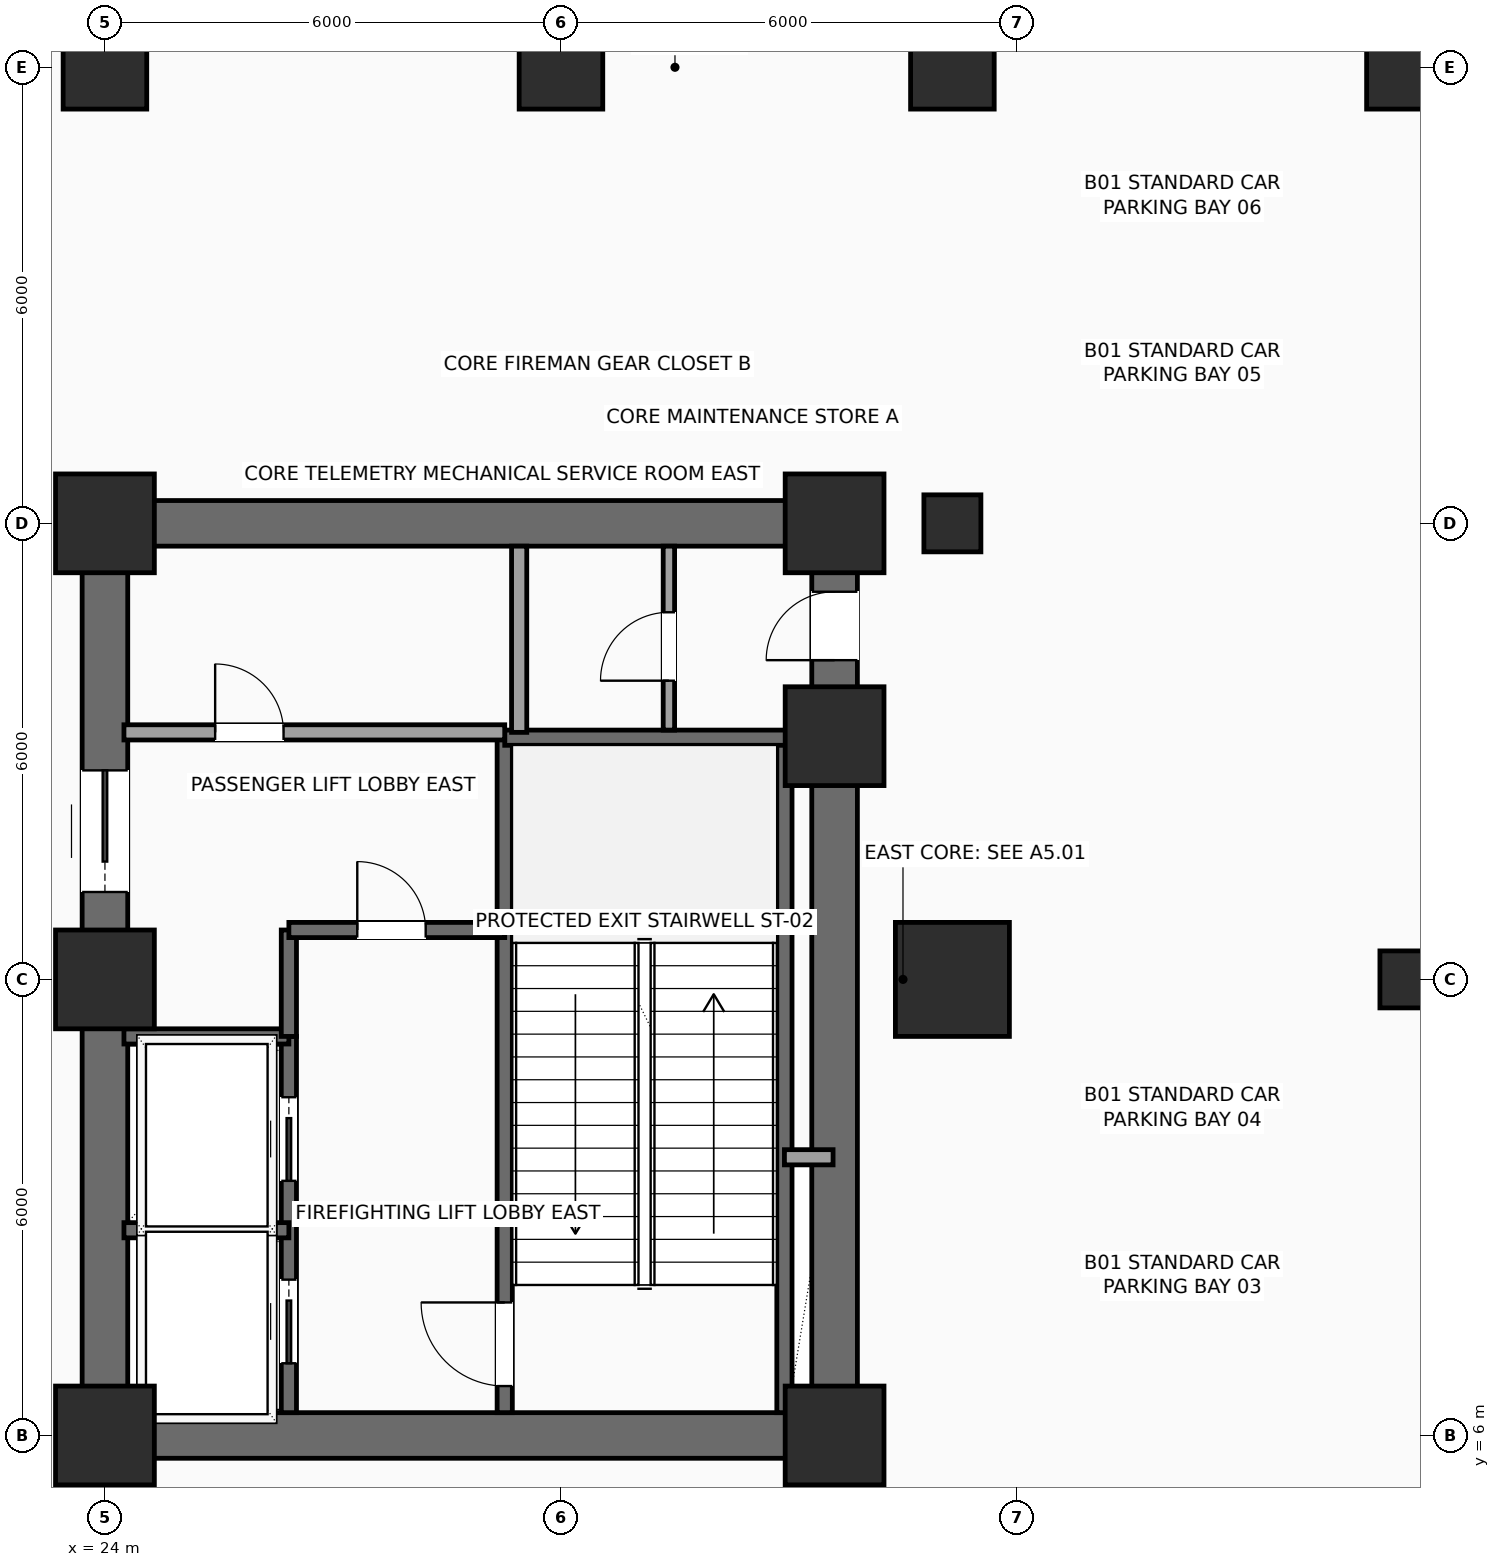
"""IFC4 building model, lengths in metres.
Left out: names, types, materials, properties, quantities, classifications, styles, units other than length and angle.
Written with IfcOpenShell. Run it as: python <this file> out.ifc"""

import sys

from ifc_helpers import new_model, si_unit, direction, frame, frame_2d, origin, origin_2d, place, context, subcontext, project, spatial, rectangle, hollow_rectangle, extrude, element, fill, save


model = new_model("IFC4")
c1 = context("Model", 3, precision=1e-05, world=origin(), true_north=direction((0.0, 1.0)))
c2 = subcontext(c1, "Body", "Model", "MODEL_VIEW")
j1 = project(units=[si_unit("LENGTHUNIT", "METRE"), si_unit("PLANEANGLEUNIT", "RADIAN")], contexts=[c1])
p1 = place(None, origin())
s1 = spatial("IfcSite", under=j1, at=p1, CompositionType="ELEMENT")
p2 = place(p1, origin())
s2 = spatial("IfcBuilding", under=s1, at=p2, CompositionType="ELEMENT")
p3 = place(p2, frame((0.0, 0.0, -4.8)))
s3 = spatial("IfcBuildingStorey", under=s2, at=p3, CompositionType="ELEMENT", Elevation=-4.8)
for number, where, z_axis, x_axis in (
    (1, (24.0, 6.0, 0.0), (0.0, 0.0, 1.0), (1.0, 0.0, 0.0)),
    (2, (24.0, 12.0, 0.0), (0.0, 0.0, 1.0), (1.0, 0.0, 0.0)),
    (3, (24.0, 18.0, 0.0), (0.0, 0.0, 1.0), (1.0, 0.0, 0.0)),
    (4, (33.6, 6.0, 0.0), (0.0, 0.0, 1.0), (1.0, 0.0, 0.0)),
    (5, (33.6, 15.2, 0.0), (0.0, 0.0, 1.0), (1.0, 0.0, 0.0)),
    (6, (33.6, 18.0, 0.0), (0.0, 0.0, 1.0), (1.0, 0.0, 0.0)),
):
    element("IfcColumn", number, at=place(p3, frame(where, z_axis=z_axis, x_axis=x_axis)), inside=s3, PredefinedType="COLUMN", context=c2, shape_type="SweptSolid", body=[
        extrude(rectangle(XDim=1.3, YDim=1.3, at=origin_2d()), origin(), (0.0, 0.0, 1.0), 4.8),
    ])
for number, where, z_axis, x_axis in (
    (7, (24.0, 24.0, 0.0), (0.0, 0.0, 1.0), (1.0, 0.0, 0.0)),
    (8, (30.0, 24.0, 0.0), (0.0, 0.0, 1.0), (1.0, 0.0, 0.0)),
):
    element("IfcColumn", number, at=place(p3, frame(where, z_axis=z_axis, x_axis=x_axis)), inside=s3, PredefinedType="COLUMN", context=c2, shape_type="SweptSolid", body=[
        extrude(rectangle(XDim=1.1, YDim=1.1, at=origin_2d()), origin(), (0.0, 0.0, 1.0), 4.8),
    ])
p4 = place(p3, frame((35.15, 12.0, 0.0), z_axis=(0.0, 0.0, 1.0), x_axis=(1.0, 0.0, 0.0)))
e9 = element("IfcColumn", 9, at=p4, inside=s3, PredefinedType="COLUMN", context=c2, shape_type="SweptSolid", body=[
    extrude(rectangle(XDim=1.5, YDim=1.5, at=origin_2d()), origin(), (0.0, 0.0, 1.0), 4.8),
])
p5 = place(p3, frame((35.15, 18.0, 0.0), z_axis=(0.0, 0.0, 1.0), x_axis=(1.0, 0.0, 0.0)))
e10 = element("IfcColumn", 10, at=p5, inside=s3, PredefinedType="COLUMN", context=c2, shape_type="SweptSolid", body=[
    extrude(hollow_rectangle(XDim=0.75, YDim=0.75, WallThickness=0.035, InnerFilletRadius=0.035, OuterFilletRadius=0.05, at=origin_2d()), origin(), (0.0, 0.0, 1.0), 4.8),
])
p6 = place(p3, frame((35.15, 24.0, 0.0), z_axis=(0.0, 0.0, 1.0), x_axis=(1.0, 0.0, 0.0)))
e11 = element("IfcColumn", 11, at=p6, inside=s3, PredefinedType="COLUMN", context=c2, shape_type="SweptSolid", body=[
    extrude(rectangle(XDim=1.1, YDim=1.1, at=origin_2d()), origin(), (0.0, 0.0, 1.0), 4.8),
])
p7 = place(p3, frame((41.15, 12.0, 0.0), z_axis=(0.0, 0.0, 1.0), x_axis=(1.0, 0.0, 0.0)))
e12 = element("IfcColumn", 12, at=p7, inside=s3, PredefinedType="COLUMN", context=c2, shape_type="SweptSolid", body=[
    extrude(hollow_rectangle(XDim=0.75, YDim=0.75, WallThickness=0.035, InnerFilletRadius=0.035, OuterFilletRadius=0.05, at=origin_2d()), origin(), (0.0, 0.0, 1.0), 4.8),
])
p8 = place(p3, frame((41.15, 24.0, 0.0), z_axis=(0.0, 0.0, 1.0), x_axis=(1.0, 0.0, 0.0)))
e13 = element("IfcColumn", 13, at=p8, inside=s3, PredefinedType="COLUMN", context=c2, shape_type="SweptSolid", body=[
    extrude(rectangle(XDim=1.1, YDim=1.1, at=origin_2d()), origin(), (0.0, 0.0, 1.0), 4.8),
])
for number, where, z_axis, x_axis in (
    (14, (24.0, 6.0, 0.0), (0.0, 0.0, 1.0), (1.0, 0.0, 0.0)),
    (15, (24.0, 18.0, 0.0), (0.0, 0.0, 1.0), (1.0, 0.0, 0.0)),
):
    element("IfcWall", number, at=place(p3, frame(where, z_axis=z_axis, x_axis=x_axis)), inside=s3, PredefinedType="SHEAR", context=c2, shape_type="SweptSolid", body=[
        extrude(rectangle(XDim=9.6, YDim=0.6, at=frame_2d((4.8, 0.0))), origin(), (0.0, 0.0, 1.0), 4.45),
    ])
p9 = place(p3, frame((24.0, 6.0, 0.0), z_axis=(0.0, 0.0, 1.0), x_axis=(0.0, 1.0, 0.0)))
e16 = element("IfcWall", 16, at=p9, inside=s3, PredefinedType="SHEAR", context=c2, shape_type="SweptSolid", body=[
    extrude(rectangle(XDim=12.0, YDim=0.6, at=frame_2d((6.0, 0.0))), origin(), (0.0, 0.0, 1.0), 4.45),
])
p10 = place(p9, frame((7.15, 0.0, 0.0)))
e17 = element("IfcOpeningElement", 17, at=p10, cuts=e16, PredefinedType="OPENING", context=c2, shape_type="SweptSolid", body=[
    extrude(rectangle(XDim=1.6, YDim=2.3, at=frame_2d((0.8, 1.15))), frame((0.0, 0.31, 0.0), z_axis=(0.0, -1.0, 0.0), x_axis=(1.0, 0.0, 0.0)), (0.0, 0.0, 1.0), 0.62),
])
p11 = place(p3, frame((33.6, 6.0, 0.0), z_axis=(0.0, 0.0, 1.0), x_axis=(0.0, 1.0, 0.0)))
e18 = element("IfcWall", 18, at=p11, inside=s3, PredefinedType="SHEAR", context=c2, shape_type="SweptSolid", body=[
    extrude(rectangle(XDim=12.0, YDim=0.6, at=frame_2d((6.0, 0.0))), origin(), (0.0, 0.0, 1.0), 4.45),
])
p12 = place(p11, frame((10.2, 0.0, 0.0)))
e19 = element("IfcOpeningElement", 19, at=p12, cuts=e18, PredefinedType="OPENING", context=c2, shape_type="SweptSolid", body=[
    extrude(rectangle(XDim=0.9, YDim=2.15, at=frame_2d((0.45, 1.075))), frame((0.0, 0.31, 0.0), z_axis=(0.0, -1.0, 0.0), x_axis=(1.0, 0.0, 0.0)), (0.0, 0.0, 1.0), 0.62),
])
p13 = place(p3, frame((29.26, 6.3, 0.0), z_axis=(0.0, 0.0, 1.0), x_axis=(0.0, 1.0, 0.0)))
e20 = element("IfcWall", 20, at=p13, inside=s3, PredefinedType="SHEAR", context=c2, shape_type="SweptSolid", body=[
    extrude(rectangle(XDim=8.88, YDim=0.2, at=frame_2d((4.44, 0.0))), origin(), (0.0, 0.0, 1.0), 4.45),
])
p14 = place(p13, frame((0.35, 0.0, 0.0)))
e21 = element("IfcOpeningElement", 21, at=p14, cuts=e20, PredefinedType="OPENING", context=c2, shape_type="SweptSolid", body=[
    extrude(rectangle(XDim=1.1, YDim=2.2, at=frame_2d((0.55, 1.1))), frame((0.0, 0.11, 0.0), z_axis=(0.0, -1.0, 0.0), x_axis=(1.0, 0.0, 0.0)), (0.0, 0.0, 1.0), 0.22),
])
p15 = place(p3, frame((32.94, 6.3, 0.0), z_axis=(0.0, 0.0, 1.0), x_axis=(0.0, 1.0, 0.0)))
e22 = element("IfcWall", 22, at=p15, inside=s3, PredefinedType="SHEAR", context=c2, shape_type="SweptSolid", body=[
    extrude(rectangle(XDim=8.88, YDim=0.2, at=frame_2d((4.44, 0.0))), origin(), (0.0, 0.0, 1.0), 4.45),
])
p16 = place(p3, frame((29.26, 15.18, 0.0), z_axis=(0.0, 0.0, 1.0), x_axis=(1.0, 0.0, 0.0)))
e23 = element("IfcWall", 23, at=p16, inside=s3, PredefinedType="SHEAR", context=c2, shape_type="SweptSolid", body=[
    extrude(rectangle(XDim=4.04, YDim=0.2, at=frame_2d((2.02, 0.0))), origin(), (0.0, 0.0, 1.0), 4.45),
])
p17 = place(p3, frame((26.42, 6.3, 0.0), z_axis=(0.0, 0.0, 1.0), x_axis=(0.0, 1.0, 0.0)))
e24 = element("IfcWall", 24, at=p17, inside=s3, PredefinedType="SHEAR", context=c2, shape_type="SweptSolid", body=[
    extrude(rectangle(XDim=4.95, YDim=0.2, at=frame_2d((2.475, 0.0))), origin(), (0.0, 0.0, 1.0), 4.45),
])
p18 = place(p17, frame((0.65, 0.0, 0.0)))
e25 = element("IfcOpeningElement", 25, at=p18, cuts=e24, PredefinedType="OPENING", context=c2, shape_type="SweptSolid", body=[
    extrude(rectangle(XDim=1.1, YDim=2.2, at=frame_2d((0.55, 1.1))), frame((0.0, 0.11, 0.0), z_axis=(0.0, -1.0, 0.0), x_axis=(1.0, 0.0, 0.0)), (0.0, 0.0, 1.0), 0.22),
])
p19 = place(p17, frame((3.05, 0.0, 0.0)))
e26 = element("IfcOpeningElement", 26, at=p19, cuts=e24, PredefinedType="OPENING", context=c2, shape_type="SweptSolid", body=[
    extrude(rectangle(XDim=1.1, YDim=2.2, at=frame_2d((0.55, 1.1))), frame((0.0, 0.11, 0.0), z_axis=(0.0, -1.0, 0.0), x_axis=(1.0, 0.0, 0.0)), (0.0, 0.0, 1.0), 0.22),
])
for number, where, z_axis, x_axis in (
    (27, (24.25, 8.7, 0.0), (0.0, 0.0, 1.0), (1.0, 0.0, 0.0)),
    (28, (24.25, 11.25, 0.0), (0.0, 0.0, 1.0), (1.0, 0.0, 0.0)),
):
    element("IfcWall", number, at=place(p3, frame(where, z_axis=z_axis, x_axis=x_axis)), inside=s3, PredefinedType="SHEAR", context=c2, shape_type="SweptSolid", body=[
        extrude(rectangle(XDim=2.17, YDim=0.2, at=frame_2d((1.085, 0.0))), origin(), (0.0, 0.0, 1.0), 4.45),
    ])
p20 = place(p3, frame((26.42, 11.25, 0.0), z_axis=(0.0, 0.0, 1.0), x_axis=(0.0, 1.0, 0.0)))
e29 = element("IfcWall", 29, at=p20, inside=s3, PredefinedType="SHEAR", context=c2, shape_type="SweptSolid", body=[
    extrude(rectangle(XDim=1.4, YDim=0.2, at=frame_2d((0.7, 0.0))), origin(), (0.0, 0.0, 1.0), 4.45),
])
p21 = place(p3, frame((26.42, 12.65, 0.0), z_axis=(0.0, 0.0, 1.0), x_axis=(1.0, 0.0, 0.0)))
e30 = element("IfcWall", 30, at=p21, inside=s3, PredefinedType="SHEAR", context=c2, shape_type="SweptSolid", body=[
    extrude(rectangle(XDim=2.84, YDim=0.2, at=frame_2d((1.42, 0.0))), origin(), (0.0, 0.0, 1.0), 4.45),
])
p22 = place(p21, frame((0.9, 0.0, 0.0)))
e31 = element("IfcOpeningElement", 31, at=p22, cuts=e30, PredefinedType="OPENING", context=c2, shape_type="SweptSolid", body=[
    extrude(rectangle(XDim=0.9, YDim=2.15, at=frame_2d((0.45, 1.075))), frame((0.0, 0.11, 0.0), z_axis=(0.0, -1.0, 0.0), x_axis=(1.0, 0.0, 0.0)), (0.0, 0.0, 1.0), 0.22),
])
p23 = place(p3, frame((32.94, 9.66, 0.0), z_axis=(0.0, 0.0, 1.0), x_axis=(1.0, 0.0, 0.0)))
e32 = element("IfcWall", 32, at=p23, inside=s3, PredefinedType="SOLIDWALL", context=c2, shape_type="SweptSolid", body=[
    extrude(rectangle(XDim=0.64, YDim=0.2, at=frame_2d((0.32, 0.0))), origin(), (0.0, 0.0, 1.0), 4.45),
])
p24 = place(p3, frame((24.25, 15.25, 0.0), z_axis=(0.0, 0.0, 1.0), x_axis=(1.0, 0.0, 0.0)))
e33 = element("IfcWall", 33, at=p24, inside=s3, PredefinedType="SOLIDWALL", context=c2, shape_type="SweptSolid", body=[
    extrude(rectangle(XDim=5.01, YDim=0.2, at=frame_2d((2.505, 0.0))), origin(), (0.0, 0.0, 1.0), 4.45),
])
p25 = place(p24, frame((1.2, 0.0, 0.0)))
e34 = element("IfcOpeningElement", 34, at=p25, cuts=e33, PredefinedType="OPENING", context=c2, shape_type="SweptSolid", body=[
    extrude(rectangle(XDim=0.9, YDim=2.15, at=frame_2d((0.45, 1.075))), frame((0.0, 0.11, 0.0), z_axis=(0.0, -1.0, 0.0), x_axis=(1.0, 0.0, 0.0)), (0.0, 0.0, 1.0), 0.22),
])
p26 = place(p3, frame((29.45, 15.25, 0.0), z_axis=(0.0, 0.0, 1.0), x_axis=(0.0, 1.0, 0.0)))
e35 = element("IfcWall", 35, at=p26, inside=s3, PredefinedType="SOLIDWALL", context=c2, shape_type="SweptSolid", body=[
    extrude(rectangle(XDim=2.45, YDim=0.2, at=frame_2d((1.225, 0.0))), origin(), (0.0, 0.0, 1.0), 4.45),
])
p27 = place(p3, frame((31.42, 15.28, 0.0), z_axis=(0.0, 0.0, 1.0), x_axis=(0.0, 1.0, 0.0)))
e36 = element("IfcWall", 36, at=p27, inside=s3, PredefinedType="PARTITIONING", context=c2, shape_type="SweptSolid", body=[
    extrude(rectangle(XDim=2.42, YDim=0.15, at=frame_2d((1.21, 0.0))), origin(), (0.0, 0.0, 1.0), 4.45),
])
p28 = place(p27, frame((0.65, 0.0, 0.0)))
e37 = element("IfcOpeningElement", 37, at=p28, cuts=e36, PredefinedType="OPENING", context=c2, shape_type="SweptSolid", body=[
    extrude(rectangle(XDim=0.9, YDim=2.15, at=frame_2d((0.45, 1.075))), frame((0.0, 0.085, 0.0), z_axis=(0.0, -1.0, 0.0), x_axis=(1.0, 0.0, 0.0)), (0.0, 0.0, 1.0), 0.17),
])
p29 = place(p10, origin())
e38 = element("IfcDoor", 38, at=p29, inside=s3, OperationType="DOUBLE_DOOR_SLIDING", PredefinedType="DOOR", context=c2, shape_type="SweptSolid", body=[
    extrude(rectangle(XDim=1.6, YDim=2.3, at=frame_2d((0.8, 1.15))), frame((0.0, 0.025, 0.0), z_axis=(0.0, -1.0, 0.0), x_axis=(1.0, 0.0, 0.0)), (0.0, 0.0, 1.0), 0.05),
])
fill(e17, e38)
p30 = place(p12, origin())
e39 = element("IfcDoor", 39, at=p30, inside=s3, OperationType="SINGLE_SWING_LEFT", PredefinedType="DOOR", context=c2, shape_type="SweptSolid", body=[
    extrude(rectangle(XDim=0.9, YDim=2.15, at=frame_2d((0.45, 1.075))), frame((0.0, 0.025, 0.0), z_axis=(0.0, -1.0, 0.0), x_axis=(1.0, 0.0, 0.0)), (0.0, 0.0, 1.0), 0.05),
])
fill(e19, e39)
p31 = place(p14, origin())
e40 = element("IfcDoor", 40, at=p31, inside=s3, OperationType="SINGLE_SWING_RIGHT", PredefinedType="DOOR", context=c2, shape_type="SweptSolid", body=[
    extrude(rectangle(XDim=1.1, YDim=2.2, at=frame_2d((0.55, 1.1))), frame((0.0, 0.025, 0.0), z_axis=(0.0, -1.0, 0.0), x_axis=(1.0, 0.0, 0.0)), (0.0, 0.0, 1.0), 0.05),
])
fill(e21, e40)
p32 = place(p18, origin())
e41 = element("IfcDoor", 41, at=p32, inside=s3, OperationType="SLIDING_TO_LEFT", PredefinedType="DOOR", context=c2, shape_type="SweptSolid", body=[
    extrude(rectangle(XDim=1.1, YDim=2.2, at=frame_2d((0.55, 1.1))), frame((0.0, 0.025, 0.0), z_axis=(0.0, -1.0, 0.0), x_axis=(1.0, 0.0, 0.0)), (0.0, 0.0, 1.0), 0.05),
])
fill(e25, e41)
p33 = place(p19, origin())
e42 = element("IfcDoor", 42, at=p33, inside=s3, OperationType="SLIDING_TO_LEFT", PredefinedType="DOOR", context=c2, shape_type="SweptSolid", body=[
    extrude(rectangle(XDim=1.1, YDim=2.2, at=frame_2d((0.55, 1.1))), frame((0.0, 0.025, 0.0), z_axis=(0.0, -1.0, 0.0), x_axis=(1.0, 0.0, 0.0)), (0.0, 0.0, 1.0), 0.05),
])
fill(e26, e42)
p34 = place(p22, origin())
e43 = element("IfcDoor", 43, at=p34, inside=s3, OperationType="SINGLE_SWING_LEFT", PredefinedType="DOOR", context=c2, shape_type="SweptSolid", body=[
    extrude(rectangle(XDim=0.9, YDim=2.15, at=frame_2d((0.45, 1.075))), frame((0.0, 0.025, 0.0), z_axis=(0.0, -1.0, 0.0), x_axis=(1.0, 0.0, 0.0)), (0.0, 0.0, 1.0), 0.05),
])
fill(e31, e43)
p35 = place(p25, origin())
e44 = element("IfcDoor", 44, at=p35, inside=s3, OperationType="SINGLE_SWING_LEFT", PredefinedType="DOOR", context=c2, shape_type="SweptSolid", body=[
    extrude(rectangle(XDim=0.9, YDim=2.15, at=frame_2d((0.45, 1.075))), frame((0.0, 0.025, 0.0), z_axis=(0.0, -1.0, 0.0), x_axis=(1.0, 0.0, 0.0)), (0.0, 0.0, 1.0), 0.05),
])
fill(e34, e44)
p36 = place(p28, origin())
e45 = element("IfcDoor", 45, at=p36, inside=s3, OperationType="SINGLE_SWING_LEFT", PredefinedType="DOOR", context=c2, shape_type="SweptSolid", body=[
    extrude(rectangle(XDim=0.9, YDim=2.15, at=frame_2d((0.45, 1.075))), frame((0.0, 0.025, 0.0), z_axis=(0.0, -1.0, 0.0), x_axis=(1.0, 0.0, 0.0)), (0.0, 0.0, 1.0), 0.05),
])
fill(e37, e45)
save(model, sys.argv[1])
